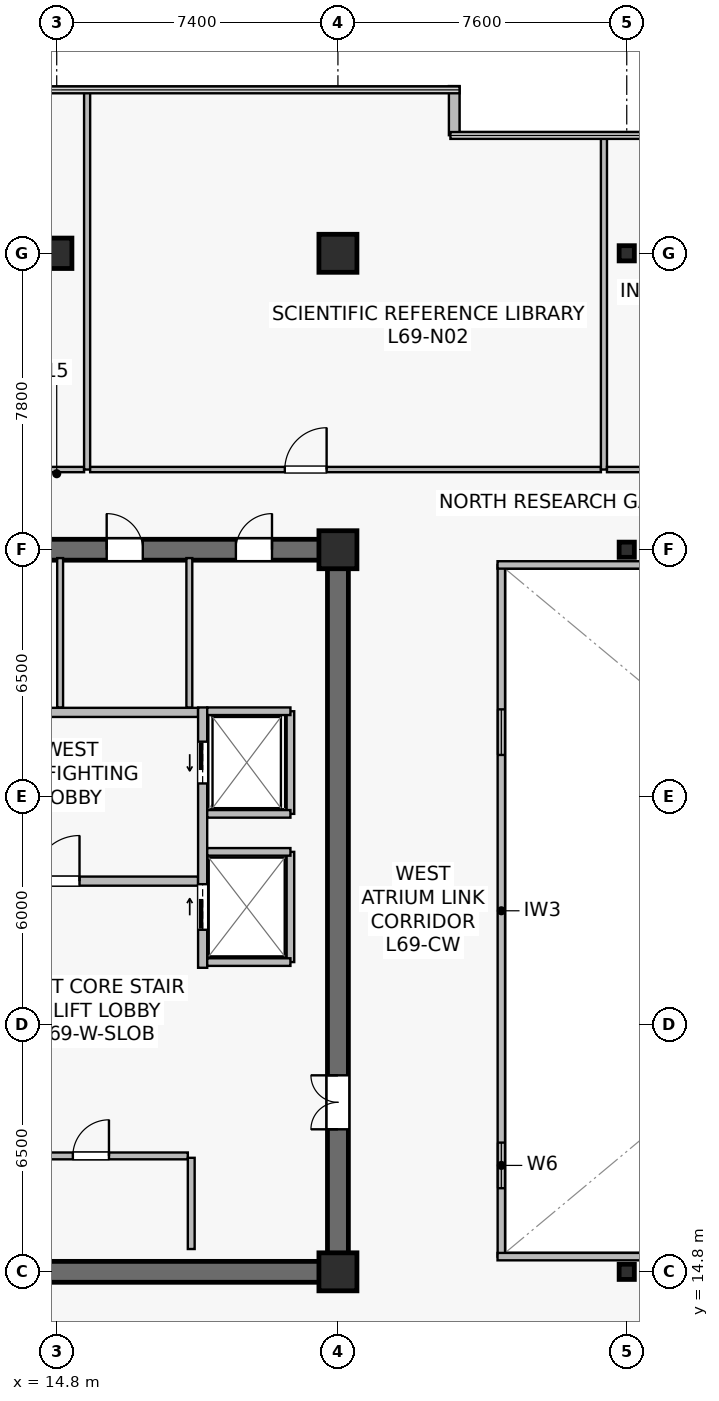
"""IFC4 building model, lengths in metres.
Left out: names, types, materials, properties, quantities, classifications, styles, units other than length and angle.
Written with IfcOpenShell. Run it as: python <this file> out.ifc"""

import sys

from ifc_helpers import new_model, si_unit, direction, frame, frame_2d, origin, origin_2d, place, context, subcontext, project, spatial, rectangle, hollow_rectangle, extrude, source, transform, mapped, element, fill, save


model = new_model("IFC4")
c1 = context("Model", 3, precision=1e-05, world=origin(), true_north=direction((0.0, 1.0)))
c2 = subcontext(c1, "Body", "Model", "MODEL_VIEW")
j1 = project(units=[si_unit("LENGTHUNIT", "METRE"), si_unit("PLANEANGLEUNIT", "RADIAN")], contexts=[c1])
p1 = place(None, origin())
s1 = spatial("IfcSite", under=j1, at=p1, CompositionType="ELEMENT")
p2 = place(p1, origin())
s2 = spatial("IfcBuilding", under=s1, at=p2, CompositionType="ELEMENT")
p3 = place(p2, frame((0.0, 0.0, 287.5)))
s3 = spatial("IfcBuildingStorey", under=s2, at=p3, CompositionType="ELEMENT", Elevation=287.5)
p4 = place(p3, frame((7.125, 14.8, 0.0), z_axis=(0.0, 0.0, 1.0), x_axis=(1.0, 0.0, 0.0)))
e1 = element("IfcWall", 1, at=p4, inside=s3, PredefinedType="SHEAR", context=c2, shape_type="SweptSolid", body=[
    extrude(rectangle(XDim=15.35, YDim=0.55, at=frame_2d((7.675, 0.0))), origin(), (0.0, 0.0, 1.0), 3.8),
])
p5 = place(p3, frame((7.125, 33.8, 0.0), z_axis=(0.0, 0.0, 1.0), x_axis=(1.0, 0.0, 0.0)))
e2 = element("IfcWall", 2, at=p5, inside=s3, PredefinedType="SHEAR", context=c2, shape_type="SweptSolid", body=[
    extrude(rectangle(XDim=15.35, YDim=0.55, at=frame_2d((7.675, 0.0))), origin(), (0.0, 0.0, 1.0), 3.8),
])
p6 = place(p5, frame((5.625, 0.0, 0.0)))
e3 = element("IfcOpeningElement", 3, at=p6, cuts=e2, PredefinedType="OPENING", context=c2, shape_type="SweptSolid", body=[
    extrude(rectangle(XDim=0.95, YDim=2.15, at=frame_2d((0.475, 1.075))), frame((0.0, 0.285, 0.0), z_axis=(0.0, -1.0, 0.0), x_axis=(1.0, 0.0, 0.0)), (0.0, 0.0, 1.0), 0.57),
])
p7 = place(p5, frame((8.99, 0.0, 0.0)))
e4 = element("IfcOpeningElement", 4, at=p7, cuts=e2, PredefinedType="OPENING", context=c2, shape_type="SweptSolid", body=[
    extrude(rectangle(XDim=0.95, YDim=2.15, at=frame_2d((0.475, 1.075))), frame((0.0, 0.285, 0.0), z_axis=(0.0, -1.0, 0.0), x_axis=(1.0, 0.0, 0.0)), (0.0, 0.0, 1.0), 0.57),
])
p8 = place(p5, frame((12.39, 0.0, 0.0)))
e5 = element("IfcOpeningElement", 5, at=p8, cuts=e2, PredefinedType="OPENING", context=c2, shape_type="SweptSolid", body=[
    extrude(rectangle(XDim=0.95, YDim=2.15, at=frame_2d((0.475, 1.075))), frame((0.0, 0.285, 0.0), z_axis=(0.0, -1.0, 0.0), x_axis=(1.0, 0.0, 0.0)), (0.0, 0.0, 1.0), 0.57),
])
p9 = place(p3, frame((22.2, 15.075, 0.0), z_axis=(0.0, 0.0, 1.0), x_axis=(0.0, 1.0, 0.0)))
e6 = element("IfcWall", 6, at=p9, inside=s3, PredefinedType="SHEAR", context=c2, shape_type="SweptSolid", body=[
    extrude(rectangle(XDim=18.45, YDim=0.55, at=frame_2d((9.225, 0.0))), origin(), (0.0, 0.0, 1.0), 3.8),
])
p10 = place(p9, frame((3.475, 0.0, 0.0)))
e7 = element("IfcOpeningElement", 7, at=p10, cuts=e6, PredefinedType="OPENING", context=c2, shape_type="SweptSolid", body=[
    extrude(rectangle(XDim=1.42, YDim=2.2, at=frame_2d((0.71, 1.1))), frame((0.0, 0.285, 0.0), z_axis=(0.0, -1.0, 0.0), x_axis=(1.0, 0.0, 0.0)), (0.0, 0.0, 1.0), 0.57),
])
m1 = source(origin(), c2, "Body", "SweptSolid", [
    extrude(rectangle(XDim=1.0, YDim=1.0, at=origin_2d()), origin(), (0.0, 0.0, 1.0), 4.1),
])
for number, where, z_axis, x_axis in (
    (8, (22.2, 14.8, 0.0), (0.0, 0.0, 1.0), (1.0, 0.0, 0.0)),
    (9, (22.2, 33.8, 0.0), (0.0, 0.0, 1.0), (1.0, 0.0, 0.0)),
):
    element("IfcColumn", number, at=place(p3, frame(where, z_axis=z_axis, x_axis=x_axis)), inside=s3, PredefinedType="COLUMN", context=c2, shape_type="MappedRepresentation", body=[
        mapped(m1, transform((0.0, 0.0, 0.0), scale=1.0)),
    ])
m2 = source(origin(), c2, "Body", "SweptSolid", [
    extrude(rectangle(XDim=0.8, YDim=0.8, at=origin_2d()), origin(), (0.0, 0.0, 1.0), 4.1),
])
p11 = place(p3, frame((14.8, 41.6, 0.0), z_axis=(0.0, 0.0, 1.0), x_axis=(1.0, 0.0, 0.0)))
e10 = element("IfcColumn", 10, at=p11, inside=s3, PredefinedType="COLUMN", context=c2, shape_type="MappedRepresentation", body=[
    mapped(m2, transform((0.0, 0.0, 0.0), scale=1.0)),
])
p12 = place(p3, frame((22.2, 41.6, 0.0), z_axis=(0.0, 0.0, 1.0), x_axis=(1.0, 0.0, 0.0)))
e11 = element("IfcColumn", 11, at=p12, inside=s3, PredefinedType="COLUMN", context=c2, shape_type="MappedRepresentation", body=[
    mapped(m1, transform((0.0, 0.0, 0.0), scale=1.0)),
])
m3 = source(origin(), c2, "Body", "SweptSolid", [
    extrude(hollow_rectangle(XDim=0.4, YDim=0.4, WallThickness=0.019, at=origin_2d()), origin(), (0.0, 0.0, 1.0), 4.1),
])
for number, where, z_axis, x_axis in (
    (12, (29.8, 14.8, 0.0), (0.0, 0.0, 1.0), (1.0, 0.0, 0.0)),
    (13, (29.8, 33.8, 0.0), (0.0, 0.0, 1.0), (1.0, 0.0, 0.0)),
    (14, (29.8, 41.6, 0.0), (0.0, 0.0, 1.0), (1.0, 0.0, 0.0)),
):
    element("IfcColumn", number, at=place(p3, frame(where, z_axis=z_axis, x_axis=x_axis)), inside=s3, PredefinedType="COLUMN", context=c2, shape_type="MappedRepresentation", body=[
        mapped(m3, transform((0.0, 0.0, 0.0), scale=1.0)),
    ])
p13 = place(p3, frame((25.26, 44.707, 0.0), z_axis=(0.0, 0.0, 1.0), x_axis=(0.0, 1.0, 0.0)))
e15 = element("IfcWall", 15, at=p13, inside=s3, PredefinedType="STANDARD", context=c2, shape_type="SweptSolid", body=[
    extrude(rectangle(XDim=1.293, YDim=0.28, at=frame_2d((0.646, 0.0))), origin(), (0.0, 0.0, 1.0), 3.8),
])
p14 = place(p3, frame((11.6, 25.08, 0.0), z_axis=(0.0, 0.0, 1.0), x_axis=(1.0, 0.0, 0.0)))
e16 = element("IfcWall", 16, at=p14, inside=s3, PredefinedType="SOLIDWALL", context=c2, shape_type="SweptSolid", body=[
    extrude(rectangle(XDim=6.92, YDim=0.24, at=frame_2d((3.46, 0.0))), origin(), (0.0, 0.0, 1.0), 3.197),
])
p15 = place(p14, frame((2.6, 0.0, 0.0)))
e17 = element("IfcOpeningElement", 17, at=p15, cuts=e16, PredefinedType="OPENING", context=c2, shape_type="SweptSolid", body=[
    extrude(rectangle(XDim=1.2, YDim=2.16, at=frame_2d((0.6, 1.08))), frame((0.0, 0.13, 0.0), z_axis=(0.0, -1.0, 0.0), x_axis=(1.0, 0.0, 0.0)), (0.0, 0.0, 1.0), 0.26),
])
p16 = place(p3, frame((11.6, 29.52, 0.0), z_axis=(0.0, 0.0, 1.0), x_axis=(1.0, 0.0, 0.0)))
e18 = element("IfcWall", 18, at=p16, inside=s3, PredefinedType="SOLIDWALL", context=c2, shape_type="SweptSolid", body=[
    extrude(rectangle(XDim=6.92, YDim=0.24, at=frame_2d((3.46, 0.0))), origin(), (0.0, 0.0, 1.0), 3.197),
])
p17 = place(p3, frame((18.64, 22.8, 0.0), z_axis=(0.0, 0.0, 1.0), x_axis=(0.0, 1.0, 0.0)))
e19 = element("IfcWall", 19, at=p17, inside=s3, PredefinedType="SOLIDWALL", context=c2, shape_type="SweptSolid", body=[
    extrude(rectangle(XDim=6.85, YDim=0.24, at=frame_2d((3.425, 0.0))), origin(), (0.0, 0.0, 1.0), 2.935),
])
p18 = place(p17, frame((4.85, 0.0, 0.0)))
e20 = element("IfcOpeningElement", 20, at=p18, cuts=e19, PredefinedType="OPENING", context=c2, shape_type="SweptSolid", body=[
    extrude(rectangle(XDim=1.1, YDim=2.22, at=frame_2d((0.55, 1.11))), frame((0.0, 0.13, 0.0), z_axis=(0.0, -1.0, 0.0), x_axis=(1.0, 0.0, 0.0)), (0.0, 0.0, 1.0), 0.26),
])
p19 = place(p17, frame((1.0, 0.0, 0.0)))
e21 = element("IfcOpeningElement", 21, at=p19, cuts=e19, PredefinedType="OPENING", context=c2, shape_type="SweptSolid", body=[
    extrude(rectangle(XDim=1.2, YDim=2.22, at=frame_2d((0.6, 1.11))), frame((0.0, 0.13, 0.0), z_axis=(0.0, -1.0, 0.0), x_axis=(1.0, 0.0, 0.0)), (0.0, 0.0, 1.0), 0.26),
])
p20 = place(p3, frame((20.95, 26.85, 0.0), z_axis=(0.0, 0.0, 1.0), x_axis=(0.0, 1.0, 0.0)))
e22 = element("IfcWall", 22, at=p20, inside=s3, PredefinedType="SOLIDWALL", context=c2, shape_type="SweptSolid", body=[
    extrude(rectangle(XDim=2.7, YDim=0.2, at=frame_2d((1.35, 0.0))), origin(), (0.0, 0.0, 1.0), 3.8),
])
p21 = place(p3, frame((18.76, 29.55, 0.0), z_axis=(0.0, 0.0, 1.0), x_axis=(1.0, 0.0, 0.0)))
e23 = element("IfcWall", 23, at=p21, inside=s3, PredefinedType="SOLIDWALL", context=c2, shape_type="SweptSolid", body=[
    extrude(rectangle(XDim=2.19, YDim=0.2, at=frame_2d((1.095, 0.0))), origin(), (0.0, 0.0, 1.0), 3.8),
])
p22 = place(p3, frame((18.76, 26.85, 0.0), z_axis=(0.0, 0.0, 1.0), x_axis=(1.0, 0.0, 0.0)))
e24 = element("IfcWall", 24, at=p22, inside=s3, PredefinedType="SOLIDWALL", context=c2, shape_type="SweptSolid", body=[
    extrude(rectangle(XDim=2.19, YDim=0.2, at=frame_2d((1.095, 0.0))), origin(), (0.0, 0.0, 1.0), 3.197),
])
p23 = place(p3, frame((20.95, 22.95, 0.0), z_axis=(0.0, 0.0, 1.0), x_axis=(0.0, 1.0, 0.0)))
e25 = element("IfcWall", 25, at=p23, inside=s3, PredefinedType="SOLIDWALL", context=c2, shape_type="SweptSolid", body=[
    extrude(rectangle(XDim=2.9, YDim=0.2, at=frame_2d((1.45, 0.0))), origin(), (0.0, 0.0, 1.0), 2.935),
])
for number, where, z_axis, x_axis in (
    (26, (18.76, 25.85, 0.0), (0.0, 0.0, 1.0), (1.0, 0.0, 0.0)),
    (27, (18.76, 22.95, 0.0), (0.0, 0.0, 1.0), (1.0, 0.0, 0.0)),
):
    element("IfcWall", number, at=place(p3, frame(where, z_axis=z_axis, x_axis=x_axis)), inside=s3, PredefinedType="SOLIDWALL", context=c2, shape_type="SweptSolid", body=[
        extrude(rectangle(XDim=2.19, YDim=0.2, at=frame_2d((1.095, 0.0))), origin(), (0.0, 0.0, 1.0), 3.8),
    ])
p24 = place(p3, frame((13.15, 17.85, 0.0), z_axis=(0.0, 0.0, 1.0), x_axis=(1.0, 0.0, 0.0)))
e28 = element("IfcWall", 28, at=p24, inside=s3, PredefinedType="SOLIDWALL", context=c2, shape_type="SweptSolid", body=[
    extrude(rectangle(XDim=5.1, YDim=0.18, at=frame_2d((2.55, 0.0))), origin(), (0.0, 0.0, 1.0), 3.197),
])
p25 = place(p24, frame((2.075, 0.0, 0.0)))
e29 = element("IfcOpeningElement", 29, at=p25, cuts=e28, PredefinedType="OPENING", context=c2, shape_type="SweptSolid", body=[
    extrude(rectangle(XDim=0.95, YDim=2.15, at=frame_2d((0.475, 1.075))), frame((0.0, 0.1, 0.0), z_axis=(0.0, -1.0, 0.0), x_axis=(1.0, 0.0, 0.0)), (0.0, 0.0, 1.0), 0.2),
])
p26 = place(p3, frame((18.34, 15.4, 0.0), z_axis=(0.0, 0.0, 1.0), x_axis=(0.0, 1.0, 0.0)))
e30 = element("IfcWall", 30, at=p26, inside=s3, PredefinedType="SOLIDWALL", context=c2, shape_type="SweptSolid", body=[
    extrude(rectangle(XDim=2.4, YDim=0.18, at=frame_2d((1.2, 0.0))), origin(), (0.0, 0.0, 1.0), 3.8),
])
p27 = place(p3, frame((14.89, 29.65, 0.0), z_axis=(0.0, 0.0, 1.0), x_axis=(0.0, 1.0, 0.0)))
e31 = element("IfcWall", 31, at=p27, inside=s3, PredefinedType="PLUMBINGWALL", context=c2, shape_type="SweptSolid", body=[
    extrude(rectangle(XDim=3.93, YDim=0.155, at=frame_2d((1.965, 0.0))), origin(), (0.0, 0.0, 1.0), 3.197),
])
p28 = place(p3, frame((18.29, 29.65, 0.0), z_axis=(0.0, 0.0, 1.0), x_axis=(0.0, 1.0, 0.0)))
e32 = element("IfcWall", 32, at=p28, inside=s3, PredefinedType="PLUMBINGWALL", context=c2, shape_type="SweptSolid", body=[
    extrude(rectangle(XDim=3.93, YDim=0.155, at=frame_2d((1.965, 0.0))), origin(), (0.0, 0.0, 1.0), 3.8),
])
p29 = place(p3, frame((26.5, 15.2, 0.0), z_axis=(0.0, 0.0, 1.0), x_axis=(0.0, 1.0, 0.0)))
e33 = element("IfcWall", 33, at=p29, inside=s3, PredefinedType="SOLIDWALL", context=c2, shape_type="SweptSolid", body=[
    extrude(rectangle(XDim=18.2, YDim=0.195, at=frame_2d((9.1, 0.0))), origin(), (0.0, 0.0, 1.0), 3.8),
])
p30 = place(p29, frame((1.8, 0.0, 0.9)))
e34 = element("IfcOpeningElement", 34, at=p30, cuts=e33, PredefinedType="OPENING", context=c2, shape_type="SweptSolid", body=[
    extrude(rectangle(XDim=1.2, YDim=1.35, at=frame_2d((0.6, 0.675))), frame((0.0, 0.107, 0.0), z_axis=(0.0, -1.0, 0.0), x_axis=(1.0, 0.0, 0.0)), (0.0, 0.0, 1.0), 0.215),
])
p31 = place(p29, frame((13.2, 0.0, 0.9)))
e35 = element("IfcOpeningElement", 35, at=p31, cuts=e33, PredefinedType="OPENING", context=c2, shape_type="SweptSolid", body=[
    extrude(rectangle(XDim=1.2, YDim=1.35, at=frame_2d((0.6, 0.675))), frame((0.0, 0.107, 0.0), z_axis=(0.0, -1.0, 0.0), x_axis=(1.0, 0.0, 0.0)), (0.0, 0.0, 1.0), 0.215),
])
for number, where, z_axis, x_axis in (
    (36, (26.4, 15.2, 0.0), (0.0, 0.0, 1.0), (1.0, 0.0, 0.0)),
    (37, (26.4, 33.4, 0.0), (0.0, 0.0, 1.0), (1.0, 0.0, 0.0)),
):
    element("IfcWall", number, at=place(p3, frame(where, z_axis=z_axis, x_axis=x_axis)), inside=s3, PredefinedType="SOLIDWALL", context=c2, shape_type="SweptSolid", body=[
        extrude(rectangle(XDim=22.0, YDim=0.195, at=frame_2d((11.0, 0.0))), origin(), (0.0, 0.0, 1.0), 3.8),
    ])
p32 = place(p3, frame((7.31, 35.91, 0.0), z_axis=(0.0, 0.0, 1.0), x_axis=(1.0, 0.0, 0.0)))
e38 = element("IfcWall", 38, at=p32, inside=s3, PredefinedType="PARTITIONING", context=c2, shape_type="SweptSolid", body=[
    extrude(rectangle(XDim=8.21, YDim=0.14, at=frame_2d((4.105, 0.0))), origin(), (0.0, 0.0, 1.0), 3.197),
])
p33 = place(p32, frame((3.747, 0.0, 0.0)))
e39 = element("IfcOpeningElement", 39, at=p33, cuts=e38, PredefinedType="OPENING", context=c2, shape_type="SweptSolid", body=[
    extrude(rectangle(XDim=1.1, YDim=2.18, at=frame_2d((0.55, 1.09))), frame((0.0, 0.08, 0.0), z_axis=(0.0, -1.0, 0.0), x_axis=(1.0, 0.0, 0.0)), (0.0, 0.0, 1.0), 0.16),
])
p34 = place(p3, frame((15.6, 35.91, 0.0), z_axis=(0.0, 0.0, 1.0), x_axis=(0.0, 1.0, 0.0)))
e40 = element("IfcWall", 40, at=p34, inside=s3, PredefinedType="PARTITIONING", context=c2, shape_type="SweptSolid", body=[
    extrude(rectangle(XDim=9.98, YDim=0.16, at=frame_2d((4.99, 0.0))), origin(), (0.0, 0.0, 1.0), 3.135),
])
p35 = place(p3, frame((15.68, 35.91, 0.0), z_axis=(0.0, 0.0, 1.0), x_axis=(1.0, 0.0, 0.0)))
e41 = element("IfcWall", 41, at=p35, inside=s3, PredefinedType="PARTITIONING", context=c2, shape_type="SweptSolid", body=[
    extrude(rectangle(XDim=13.44, YDim=0.14, at=frame_2d((6.72, 0.0))), origin(), (0.0, 0.0, 1.0), 3.197),
])
p36 = place(p35, frame((5.122, 0.0, 0.0)))
e42 = element("IfcOpeningElement", 42, at=p36, cuts=e41, PredefinedType="OPENING", context=c2, shape_type="SweptSolid", body=[
    extrude(rectangle(XDim=1.1, YDim=2.18, at=frame_2d((0.55, 1.09))), frame((0.0, 0.08, 0.0), z_axis=(0.0, -1.0, 0.0), x_axis=(1.0, 0.0, 0.0)), (0.0, 0.0, 1.0), 0.16),
])
p37 = place(p3, frame((29.2, 35.91, 0.0), z_axis=(0.0, 0.0, 1.0), x_axis=(0.0, 1.0, 0.0)))
e43 = element("IfcWall", 43, at=p37, inside=s3, PredefinedType="PARTITIONING", context=c2, shape_type="SweptSolid", body=[
    extrude(rectangle(XDim=8.78, YDim=0.16, at=frame_2d((4.39, 0.0))), origin(), (0.0, 0.0, 1.0), 3.135),
])
p38 = place(p3, frame((29.28, 35.91, 0.0), z_axis=(0.0, 0.0, 1.0), x_axis=(1.0, 0.0, 0.0)))
e44 = element("IfcWall", 44, at=p38, inside=s3, PredefinedType="PARTITIONING", context=c2, shape_type="SweptSolid", body=[
    extrude(rectangle(XDim=15.04, YDim=0.14, at=frame_2d((7.52, 0.0))), origin(), (0.0, 0.0, 1.0), 3.197),
])
p39 = place(p38, frame((7.367, 0.0, 0.0)))
e45 = element("IfcOpeningElement", 45, at=p39, cuts=e44, PredefinedType="OPENING", context=c2, shape_type="SweptSolid", body=[
    extrude(rectangle(XDim=1.1, YDim=2.18, at=frame_2d((0.55, 1.09))), frame((0.0, 0.08, 0.0), z_axis=(0.0, -1.0, 0.0), x_axis=(1.0, 0.0, 0.0)), (0.0, 0.0, 1.0), 0.16),
])
m4 = source(origin(), c2, "Body", "SweptSolid", [
    extrude(rectangle(XDim=1.2, YDim=1.35, at=frame_2d((0.6, 0.675))), frame((0.0, 0.03, 0.0), z_axis=(0.0, -1.0, 0.0), x_axis=(1.0, 0.0, 0.0)), (0.0, 0.0, 1.0), 0.06),
])
p40 = place(p30, origin())
e46 = element("IfcWindow", 46, at=p40, inside=s3, PartitioningType="SINGLE_PANEL", PredefinedType="WINDOW", context=c2, shape_type="MappedRepresentation", body=[
    mapped(m4, transform((0.0, 0.0, 0.0), scale=1.0)),
])
fill(e34, e46)
p41 = place(p31, origin())
e47 = element("IfcWindow", 47, at=p41, inside=s3, PartitioningType="SINGLE_PANEL", PredefinedType="WINDOW", context=c2, shape_type="MappedRepresentation", body=[
    mapped(m4, transform((0.0, 0.0, 0.0), scale=1.0)),
])
fill(e35, e47)
m5 = source(origin(), c2, "Body", "SweptSolid", [
    extrude(rectangle(XDim=1.2, YDim=2.16, at=frame_2d((0.6, 1.08))), frame((0.0, 0.025, 0.0), z_axis=(0.0, -1.0, 0.0), x_axis=(1.0, 0.0, 0.0)), (0.0, 0.0, 1.0), 0.05),
])
p42 = place(p15, origin())
e48 = element("IfcDoor", 48, at=p42, inside=s3, OperationType="SINGLE_SWING_RIGHT", PredefinedType="DOOR", context=c2, shape_type="MappedRepresentation", body=[
    mapped(m5, transform((0.0, 0.0, 0.0), scale=1.0)),
])
fill(e17, e48)
m6 = source(origin(), c2, "Body", "SweptSolid", [
    extrude(rectangle(XDim=1.1, YDim=2.22, at=frame_2d((0.55, 1.11))), frame((0.0, 0.025, 0.0), z_axis=(0.0, -1.0, 0.0), x_axis=(1.0, 0.0, 0.0)), (0.0, 0.0, 1.0), 0.05),
])
p43 = place(p18, origin())
e49 = element("IfcDoor", 49, at=p43, inside=s3, OperationType="SLIDING_TO_LEFT", PredefinedType="USERDEFINED", context=c2, shape_type="MappedRepresentation", body=[
    mapped(m6, transform((0.0, 0.0, 0.0), scale=1.0)),
])
fill(e20, e49)
m7 = source(origin(), c2, "Body", "SweptSolid", [
    extrude(rectangle(XDim=1.2, YDim=2.22, at=frame_2d((0.6, 1.11))), frame((0.0, 0.025, 0.0), z_axis=(0.0, -1.0, 0.0), x_axis=(1.0, 0.0, 0.0)), (0.0, 0.0, 1.0), 0.05),
])
p44 = place(p19, origin())
e50 = element("IfcDoor", 50, at=p44, inside=s3, OperationType="SLIDING_TO_RIGHT", PredefinedType="USERDEFINED", context=c2, shape_type="MappedRepresentation", body=[
    mapped(m7, transform((0.0, 0.0, 0.0), scale=1.0)),
])
fill(e21, e50)
m8 = source(origin(), c2, "Body", "SweptSolid", [
    extrude(rectangle(XDim=0.95, YDim=2.15, at=frame_2d((0.475, 1.075))), frame((0.0, 0.025, 0.0), z_axis=(0.0, -1.0, 0.0), x_axis=(1.0, 0.0, 0.0)), (0.0, 0.0, 1.0), 0.05),
])
p45 = place(p25, origin())
e51 = element("IfcDoor", 51, at=p45, inside=s3, OperationType="SINGLE_SWING_RIGHT", PredefinedType="DOOR", context=c2, shape_type="MappedRepresentation", body=[
    mapped(m8, transform((0.0, 0.0, 0.0), scale=1.0)),
])
fill(e29, e51)
m9 = source(origin(), c2, "Body", "SweptSolid", [
    extrude(rectangle(XDim=1.42, YDim=2.2, at=frame_2d((0.71, 1.1))), frame((0.0, 0.025, 0.0), z_axis=(0.0, -1.0, 0.0), x_axis=(1.0, 0.0, 0.0)), (0.0, 0.0, 1.0), 0.05),
])
p46 = place(p10, origin())
e52 = element("IfcDoor", 52, at=p46, inside=s3, OperationType="DOUBLE_DOOR_SINGLE_SWING", PredefinedType="DOOR", context=c2, shape_type="MappedRepresentation", body=[
    mapped(m9, transform((0.0, 0.0, 0.0), scale=1.0)),
])
fill(e7, e52)
p47 = place(p7, origin())
e53 = element("IfcDoor", 53, at=p47, inside=s3, OperationType="SINGLE_SWING_LEFT", PredefinedType="DOOR", context=c2, shape_type="MappedRepresentation", body=[
    mapped(m8, transform((0.0, 0.0, 0.0), scale=1.0)),
])
fill(e4, e53)
p48 = place(p8, origin())
e54 = element("IfcDoor", 54, at=p48, inside=s3, OperationType="SINGLE_SWING_RIGHT", PredefinedType="DOOR", context=c2, shape_type="MappedRepresentation", body=[
    mapped(m8, transform((0.0, 0.0, 0.0), scale=1.0)),
])
fill(e5, e54)
m10 = source(origin(), c2, "Body", "SweptSolid", [
    extrude(rectangle(XDim=1.1, YDim=2.18, at=frame_2d((0.55, 1.09))), frame((0.0, 0.025, 0.0), z_axis=(0.0, -1.0, 0.0), x_axis=(1.0, 0.0, 0.0)), (0.0, 0.0, 1.0), 0.05),
])
p49 = place(p36, origin())
e55 = element("IfcDoor", 55, at=p49, inside=s3, OperationType="SINGLE_SWING_RIGHT", PredefinedType="DOOR", context=c2, shape_type="MappedRepresentation", body=[
    mapped(m10, transform((0.0, 0.0, 0.0), scale=1.0)),
])
fill(e42, e55)
save(model, sys.argv[1])
